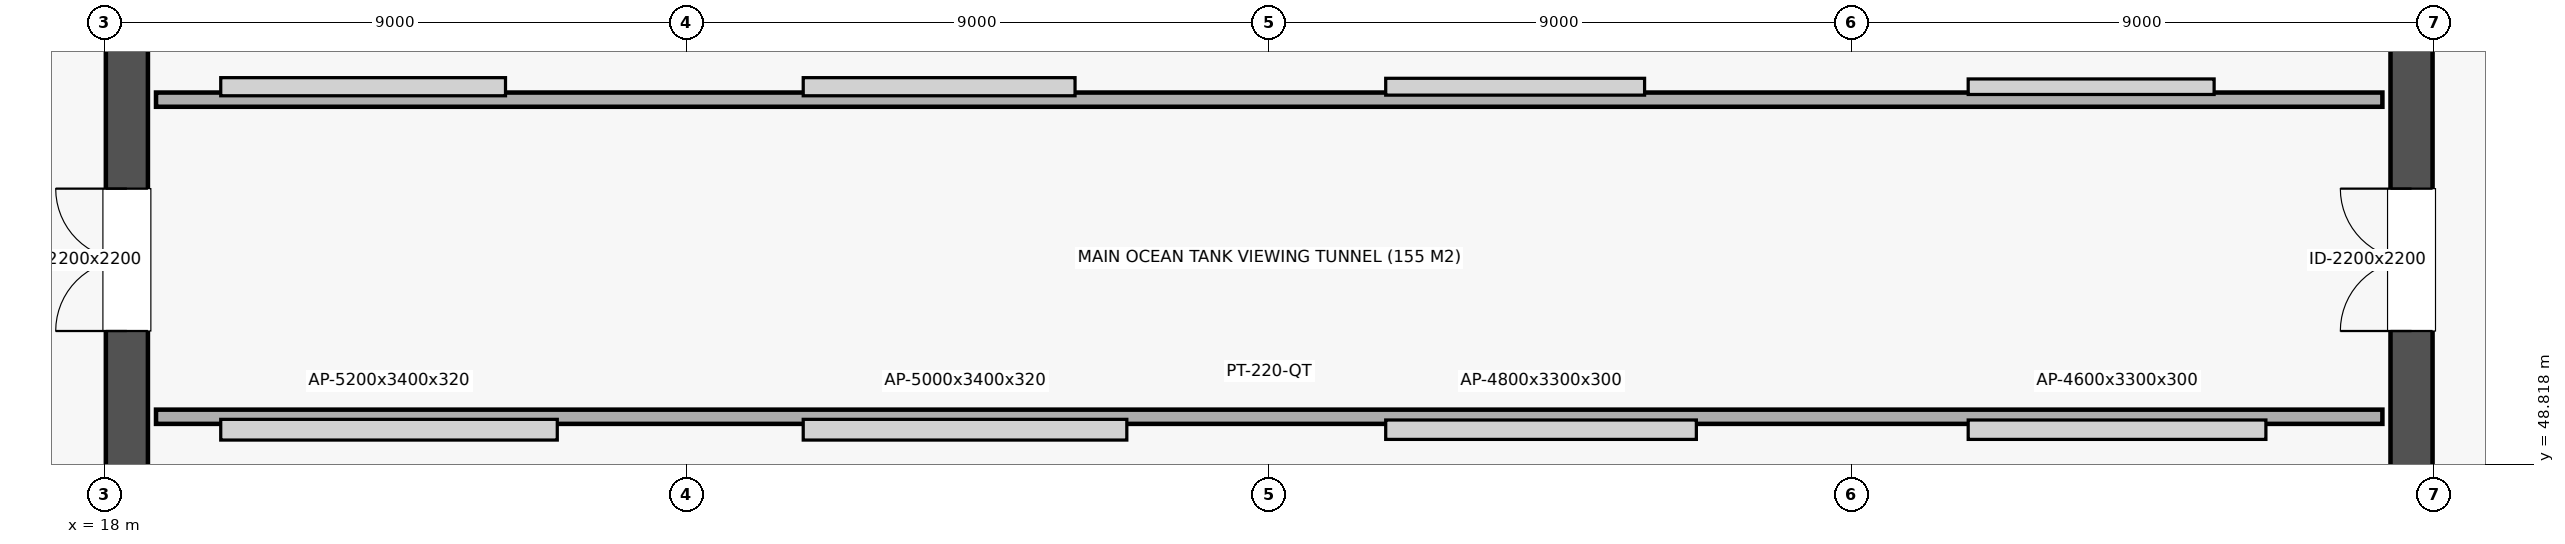
"""IFC4 building model, lengths in metres.
Left out: names, types, materials, properties, quantities, classifications, styles, units other than length and angle.
Written with IfcOpenShell. Run it as: python <this file> out.ifc"""

import sys

from ifc_helpers import new_model, si_unit, direction, frame, frame_2d, origin, place, context, subcontext, project, spatial, rectangle, extrude, element, fill, save


model = new_model("IFC4")
c1 = context("Model", 3, precision=1e-05, world=origin(), true_north=direction((0.0, 1.0)))
c2 = subcontext(c1, "Body", "Model", "MODEL_VIEW")
j1 = project(units=[si_unit("LENGTHUNIT", "METRE"), si_unit("PLANEANGLEUNIT", "RADIAN")], contexts=[c1])
p1 = place(None, origin())
s1 = spatial("IfcSite", under=j1, at=p1, CompositionType="ELEMENT")
p2 = place(p1, origin())
s2 = spatial("IfcBuilding", under=s1, at=p2, CompositionType="ELEMENT")
p3 = place(p2, frame((0.0, 0.0, 4.5)))
s3 = spatial("IfcBuildingStorey", under=s2, at=p3, CompositionType="ELEMENT", Elevation=4.5)
p4 = place(p3, frame((18.35, 40.675, 0.0), z_axis=(0.0, 0.0, 1.0), x_axis=(0.0, 1.0, 0.0)))
e1 = element("IfcWall", 1, at=p4, inside=s3, PredefinedType="SHEAR", context=c2, shape_type="SweptSolid", body=[
    extrude(rectangle(XDim=30.65, YDim=0.65, at=frame_2d((15.325, 0.0))), origin(), (0.0, 0.0, 1.0), 4.18),
])
p5 = place(p4, frame((10.2, 0.0, 0.0)))
e2 = element("IfcOpeningElement", 2, at=p5, cuts=e1, PredefinedType="OPENING", context=c2, shape_type="SweptSolid", body=[
    extrude(rectangle(XDim=2.2, YDim=2.2, at=frame_2d((1.1, 1.1))), frame((0.0, 0.337, 0.0), z_axis=(0.0, -1.0, 0.0), x_axis=(1.0, 0.0, 0.0)), (0.0, 0.0, 1.0), 0.674),
])
p6 = place(p3, frame((53.65, 40.675, 0.0), z_axis=(0.0, 0.0, 1.0), x_axis=(0.0, 1.0, 0.0)))
e3 = element("IfcWall", 3, at=p6, inside=s3, PredefinedType="SHEAR", context=c2, shape_type="SweptSolid", body=[
    extrude(rectangle(XDim=30.65, YDim=0.65, at=frame_2d((15.325, 0.0))), origin(), (0.0, 0.0, 1.0), 4.18),
])
p7 = place(p6, frame((10.2, 0.0, 0.0)))
e4 = element("IfcOpeningElement", 4, at=p7, cuts=e3, PredefinedType="OPENING", context=c2, shape_type="SweptSolid", body=[
    extrude(rectangle(XDim=2.2, YDim=2.2, at=frame_2d((1.1, 1.1))), frame((0.0, 0.337, 0.0), z_axis=(0.0, -1.0, 0.0), x_axis=(1.0, 0.0, 0.0)), (0.0, 0.0, 1.0), 0.674),
])
for number, where, z_axis, x_axis in (
    (5, (18.8, 49.55, 0.0), (0.0, 0.0, 1.0), (1.0, 0.0, 0.0)),
    (6, (18.8, 54.45, 0.0), (0.0, 0.0, 1.0), (1.0, 0.0, 0.0)),
):
    element("IfcWall", number, at=place(p3, frame(where, z_axis=z_axis, x_axis=x_axis)), inside=s3, PredefinedType="PARTITIONING", context=c2, shape_type="SweptSolid", body=[
        extrude(rectangle(XDim=34.4, YDim=0.22, at=frame_2d((17.2, 0.0))), origin(), (0.0, 0.0, 1.0), 4.18),
    ])
p8 = place(p5, origin())
e7 = element("IfcDoor", 7, at=p8, inside=s3, OperationType="DOUBLE_DOOR_SINGLE_SWING", PredefinedType="DOOR", context=c2, shape_type="SweptSolid", body=[
    extrude(rectangle(XDim=2.2, YDim=2.2, at=frame_2d((1.1, 1.1))), frame((0.0, 0.025, 0.0), z_axis=(0.0, -1.0, 0.0), x_axis=(1.0, 0.0, 0.0)), (0.0, 0.0, 1.0), 0.05),
])
fill(e2, e7)
p9 = place(p7, origin())
e8 = element("IfcDoor", 8, at=p9, inside=s3, OperationType="DOUBLE_DOOR_SINGLE_SWING", PredefinedType="DOOR", context=c2, shape_type="SweptSolid", body=[
    extrude(rectangle(XDim=2.2, YDim=2.2, at=frame_2d((1.1, 1.1))), frame((0.0, 0.025, 0.0), z_axis=(0.0, -1.0, 0.0), x_axis=(1.0, 0.0, 0.0)), (0.0, 0.0, 1.0), 0.05),
])
fill(e4, e8)
save(model, sys.argv[1])
